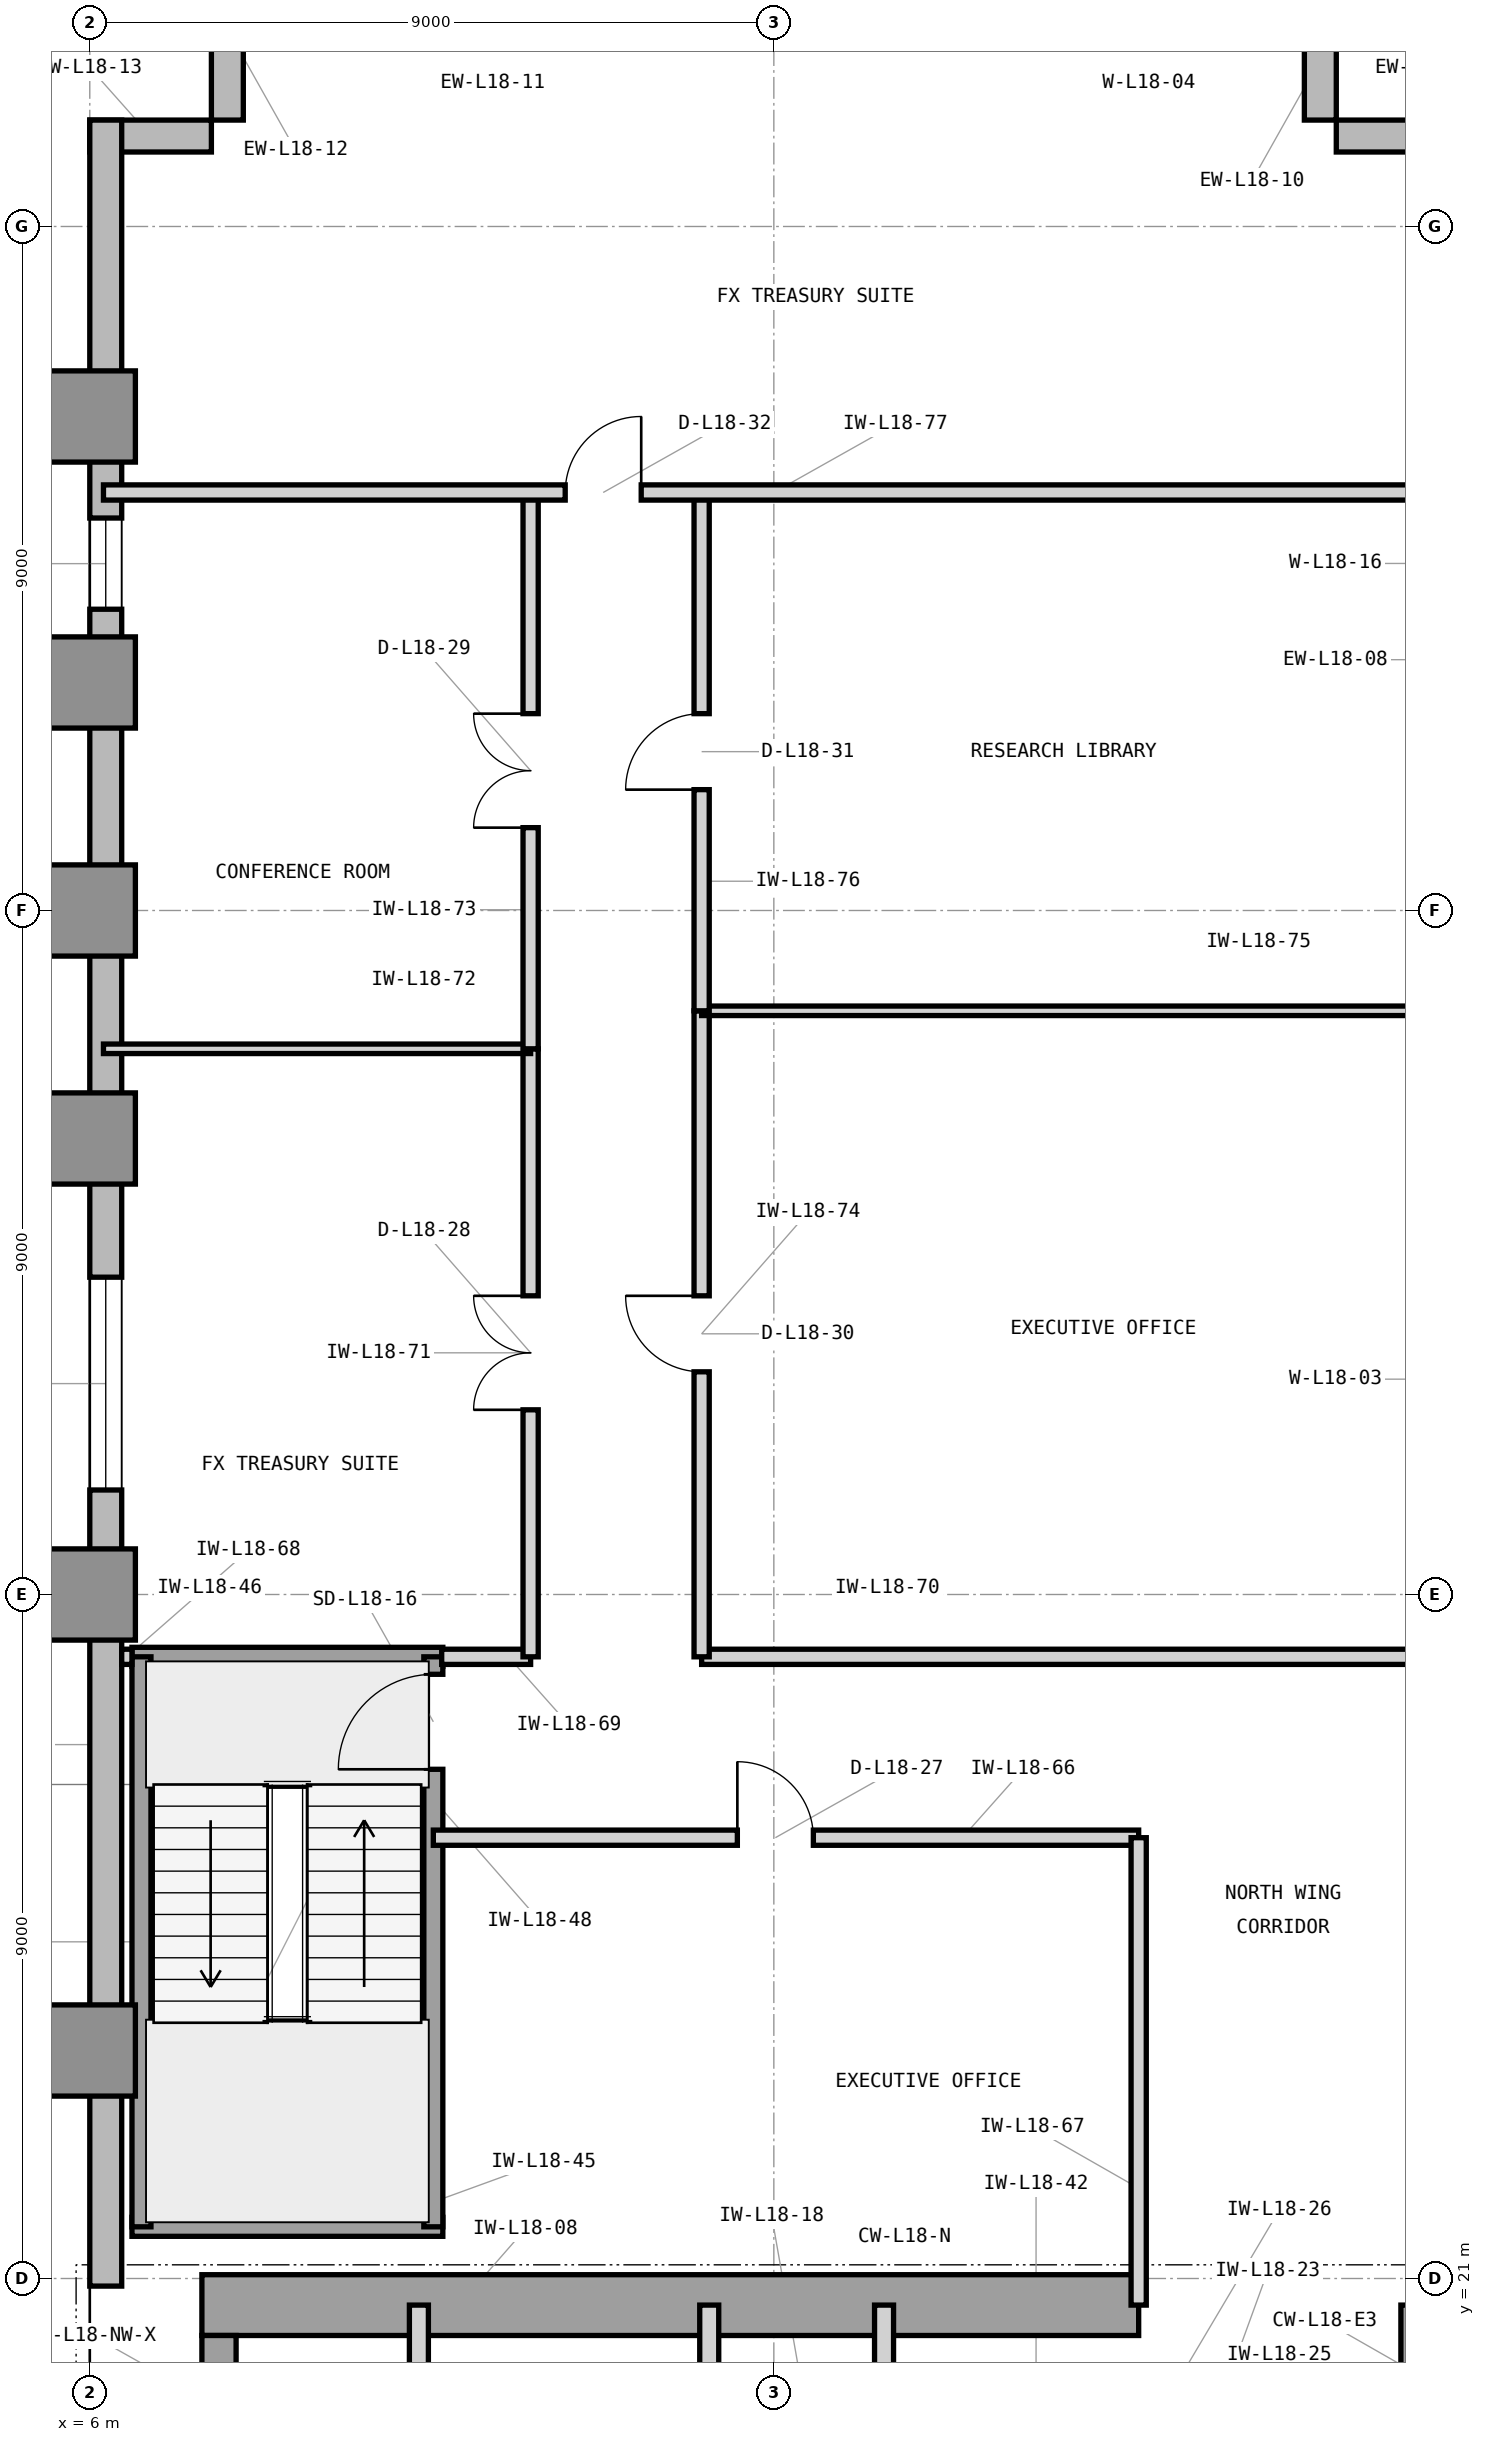
"""IFC4 building model, lengths in metres.
Left out: names, types, materials, properties, quantities, classifications, styles, units other than length and angle.
Written with IfcOpenShell. Run it as: python <this file> out.ifc"""

import sys

from ifc_helpers import new_model, si_unit, direction, frame, frame_2d, origin, origin_2d, place, context, subcontext, project, spatial, rectangle, extrude, element, fill, save


model = new_model("IFC4")
c1 = context("Model", 3, precision=1e-05, world=origin(), true_north=direction((0.0, 1.0)))
c2 = subcontext(c1, "Body", "Model", "MODEL_VIEW")
j1 = project(units=[si_unit("LENGTHUNIT", "METRE"), si_unit("PLANEANGLEUNIT", "RADIAN")], contexts=[c1])
p1 = place(None, origin())
s1 = spatial("IfcSite", under=j1, at=p1, CompositionType="ELEMENT")
p2 = place(p1, origin())
s2 = spatial("IfcBuilding", under=s1, at=p2, CompositionType="ELEMENT")
p3 = place(p2, frame((0.0, 0.0, 80.4)))
s3 = spatial("IfcBuildingStorey", under=s2, at=p3, CompositionType="ELEMENT", Elevation=80.4)
p4 = place(p3, frame((7.475, 20.65, 0.0), z_axis=(0.0, 0.0, 1.0), x_axis=(1.0, 0.0, 0.0)))
e1 = element("IfcWall", 1, at=p4, inside=s3, PredefinedType="SHEAR", context=c2, shape_type="SweptSolid", body=[
    extrude(rectangle(XDim=12.325, YDim=0.8, at=frame_2d((6.163, 0.0))), origin(), (0.0, 0.0, 1.0), 4.2),
])
p5 = place(p3, frame((23.65, 16.6, 0.0), z_axis=(0.0, 0.0, 1.0), x_axis=(0.0, 1.0, 0.0)))
e2 = element("IfcWall", 2, at=p5, inside=s3, PredefinedType="SHEAR", context=c2, shape_type="SweptSolid", body=[
    extrude(rectangle(XDim=4.05, YDim=0.8, at=frame_2d((2.025, 0.0))), origin(), (0.0, 0.0, 1.0), 4.2),
])
p6 = place(p3, frame((7.7, 19.575, 0.0), z_axis=(0.0, 0.0, 1.0), x_axis=(0.0, 1.0, 0.0)))
e3 = element("IfcWall", 3, at=p6, inside=s3, PredefinedType="SHEAR", context=c2, shape_type="SweptSolid", body=[
    extrude(rectangle(XDim=0.675, YDim=0.45, at=frame_2d((0.337, 0.0))), origin(), (0.0, 0.0, 1.0), 4.2),
])
for number, where, z_axis, x_axis in (
    (4, (6.0, 24.0, 0.0), (0.0, 0.0, 1.0), (1.0, 0.0, 0.0)),
    (5, (6.0, 30.0, 0.0), (0.0, 0.0, 1.0), (1.0, 0.0, 0.0)),
    (6, (6.0, 36.0, 0.0), (0.0, 0.0, 1.0), (1.0, 0.0, 0.0)),
    (7, (6.0, 39.0, 0.0), (0.0, 0.0, 1.0), (1.0, 0.0, 0.0)),
    (8, (6.0, 42.0, 0.0), (0.0, 0.0, 1.0), (1.0, 0.0, 0.0)),
    (9, (6.0, 45.5, 0.0), (0.0, 0.0, 1.0), (1.0, 0.0, 0.0)),
):
    element("IfcColumn", number, at=place(p3, frame(where, z_axis=z_axis, x_axis=x_axis)), inside=s3, PredefinedType="COLUMN", context=c2, shape_type="SweptSolid", body=[
        extrude(rectangle(XDim=1.2, YDim=1.2, at=origin_2d()), origin(), (0.0, 0.0, 1.0), 4.2),
    ])
for number, where, z_axis, x_axis in (
    (10, (24.0, 49.19, 0.0), (0.0, 0.0, 1.0), (-1.0, 0.0, 0.0)),
    (11, (22.19, 49.4, 0.0), (0.0, 0.0, 1.0), (0.0, 1.0, 0.0)),
    (12, (7.81, 51.0, 0.0), (0.0, 0.0, 1.0), (0.0, -1.0, 0.0)),
    (13, (7.6, 49.19, 0.0), (0.0, 0.0, 1.0), (-1.0, 0.0, 0.0)),
):
    element("IfcWall", number, at=place(p3, frame(where, z_axis=z_axis, x_axis=x_axis)), inside=s3, PredefinedType="STANDARD", context=c2, shape_type="SweptSolid", body=[
        extrude(rectangle(XDim=1.6, YDim=0.42, at=frame_2d((0.8, 0.0))), origin(), (0.0, 0.0, 1.0), 3.92),
    ])
p7 = place(p3, frame((6.21, 49.4, 0.0), z_axis=(0.0, 0.0, 1.0), x_axis=(0.0, -1.0, 0.0)))
e14 = element("IfcWall", 14, at=p7, inside=s3, PredefinedType="STANDARD", context=c2, shape_type="SweptSolid", body=[
    extrude(rectangle(XDim=28.5, YDim=0.42, at=frame_2d((14.25, 0.0))), origin(), (0.0, 0.0, 1.0), 3.92),
])
p8 = place(p7, frame((15.225, 0.0, 0.85)))
e15 = element("IfcOpeningElement", 15, at=p8, cuts=e14, PredefinedType="OPENING", context=c2, shape_type="SweptSolid", body=[
    extrude(rectangle(XDim=2.8, YDim=2.45, at=frame_2d((1.4, 1.225))), frame((0.0, 0.22, 0.0), z_axis=(0.0, -1.0, 0.0), x_axis=(1.0, 0.0, 0.0)), (0.0, 0.0, 1.0), 0.44),
])
p9 = place(p7, frame((5.236, 0.0, 0.85)))
e16 = element("IfcOpeningElement", 16, at=p9, cuts=e14, PredefinedType="OPENING", context=c2, shape_type="SweptSolid", body=[
    extrude(rectangle(XDim=1.2, YDim=2.45, at=frame_2d((0.6, 1.225))), frame((0.0, 0.22, 0.0), z_axis=(0.0, -1.0, 0.0), x_axis=(1.0, 0.0, 0.0)), (0.0, 0.0, 1.0), 0.44),
])
p10 = place(p3, frame((10.33, 19.45, 0.0), z_axis=(0.0, 0.0, 1.0), x_axis=(0.0, 1.0, 0.0)))
e17 = element("IfcWall", 17, at=p10, inside=s3, PredefinedType="PARTITIONING", context=c2, shape_type="SweptSolid", body=[
    extrude(rectangle(XDim=1.2, YDim=0.25, at=frame_2d((0.6, 0.0))), origin(), (0.0, 0.0, 1.0), 2.983),
])
for number, where, z_axis, x_axis in (
    (18, (14.15, 16.7, 0.0), (0.0, 0.0, 1.0), (0.0, 1.0, 0.0)),
    (19, (16.45, 16.7, 0.0), (0.0, 0.0, 1.0), (0.0, 1.0, 0.0)),
):
    element("IfcWall", number, at=place(p3, frame(where, z_axis=z_axis, x_axis=x_axis)), inside=s3, PredefinedType="PARTITIONING", context=c2, shape_type="SweptSolid", body=[
        extrude(rectangle(XDim=3.95, YDim=0.25, at=frame_2d((1.975, 0.0))), origin(), (0.0, 0.0, 1.0), 3.91),
    ])
for number, where, z_axis, x_axis in (
    (20, (6.555, 21.68, 0.0), (0.0, 0.0, 1.0), (1.0, 0.0, 0.0)),
    (21, (6.555, 29.18, 0.0), (0.0, 0.0, 1.0), (1.0, 0.0, 0.0)),
):
    element("IfcWall", number, at=place(p3, frame(where, z_axis=z_axis, x_axis=x_axis)), inside=s3, PredefinedType="SHEAR", context=c2, shape_type="SweptSolid", body=[
        extrude(rectangle(XDim=4.09, YDim=0.25, at=frame_2d((2.045, 0.0))), origin(), (0.0, 0.0, 1.0), 4.2),
    ])
p11 = place(p3, frame((6.68, 21.68, 0.0), z_axis=(0.0, 0.0, 1.0), x_axis=(0.0, 1.0, 0.0)))
e22 = element("IfcWall", 22, at=p11, inside=s3, PredefinedType="SHEAR", context=c2, shape_type="SweptSolid", body=[
    extrude(rectangle(XDim=7.5, YDim=0.25, at=frame_2d((3.75, 0.0))), origin(), (0.0, 0.0, 1.0), 4.2),
])
p12 = place(p3, frame((10.52, 21.68, 0.0), z_axis=(0.0, 0.0, 1.0), x_axis=(0.0, 1.0, 0.0)))
e23 = element("IfcWall", 23, at=p12, inside=s3, PredefinedType="SHEAR", context=c2, shape_type="SweptSolid", body=[
    extrude(rectangle(XDim=7.5, YDim=0.25, at=frame_2d((3.75, 0.0))), origin(), (0.0, 0.0, 1.0), 4.2),
])
p13 = place(p12, frame((6.02, 0.0, 0.0)))
e24 = element("IfcOpeningElement", 24, at=p13, cuts=e23, PredefinedType="OPENING", context=c2, shape_type="SweptSolid", body=[
    extrude(rectangle(XDim=1.25, YDim=2.2, at=frame_2d((0.625, 1.1))), frame((0.0, 0.135, 0.0), z_axis=(0.0, -1.0, 0.0), x_axis=(1.0, 0.0, 0.0)), (0.0, 0.0, 1.0), 0.27),
])
p14 = place(p3, frame((10.52, 26.8, 0.0), z_axis=(0.0, 0.0, 1.0), x_axis=(1.0, 0.0, 0.0)))
e25 = element("IfcWall", 25, at=p14, inside=s3, PredefinedType="PARTITIONING", context=c2, shape_type="SweptSolid", body=[
    extrude(rectangle(XDim=9.28, YDim=0.2, at=frame_2d((4.64, 0.0))), origin(), (0.0, 0.0, 1.0), 3.91),
])
p15 = place(p14, frame((4.0, 0.0, 0.0)))
e26 = element("IfcOpeningElement", 26, at=p15, cuts=e25, PredefinedType="OPENING", context=c2, shape_type="SweptSolid", body=[
    extrude(rectangle(XDim=1.0, YDim=2.15, at=frame_2d((0.5, 1.075))), frame((0.0, 0.11, 0.0), z_axis=(0.0, -1.0, 0.0), x_axis=(1.0, 0.0, 0.0)), (0.0, 0.0, 1.0), 0.22),
])
p16 = place(p3, frame((19.8, 20.65, 0.0), z_axis=(0.0, 0.0, 1.0), x_axis=(0.0, 1.0, 0.0)))
e27 = element("IfcWall", 27, at=p16, inside=s3, PredefinedType="PARTITIONING", context=c2, shape_type="SweptSolid", body=[
    extrude(rectangle(XDim=6.15, YDim=0.2, at=frame_2d((3.075, 0.0))), origin(), (0.0, 0.0, 1.0), 3.91),
])
p17 = place(p3, frame((6.42, 29.18, 0.0), z_axis=(0.0, 0.0, 1.0), x_axis=(1.0, 0.0, 0.0)))
e28 = element("IfcWall", 28, at=p17, inside=s3, PredefinedType="PARTITIONING", context=c2, shape_type="SweptSolid", body=[
    extrude(rectangle(XDim=0.135, YDim=0.2, at=frame_2d((0.067, 0.0))), origin(), (0.0, 0.0, 1.0), 3.91),
])
p18 = place(p3, frame((10.63, 29.18, 0.0), z_axis=(0.0, 0.0, 1.0), x_axis=(1.0, 0.0, 0.0)))
e29 = element("IfcWall", 29, at=p18, inside=s3, PredefinedType="PARTITIONING", context=c2, shape_type="SweptSolid", body=[
    extrude(rectangle(XDim=1.17, YDim=0.2, at=frame_2d((0.585, 0.0))), origin(), (0.0, 0.0, 1.0), 3.91),
])
p19 = place(p3, frame((14.05, 29.18, 0.0), z_axis=(0.0, 0.0, 1.0), x_axis=(1.0, 0.0, 0.0)))
e30 = element("IfcWall", 30, at=p19, inside=s3, PredefinedType="PARTITIONING", context=c2, shape_type="SweptSolid", body=[
    extrude(rectangle(XDim=9.77, YDim=0.2, at=frame_2d((4.885, 0.0))), origin(), (0.0, 0.0, 1.0), 3.91),
])
p20 = place(p3, frame((11.8, 29.18, 0.0), z_axis=(0.0, 0.0, 1.0), x_axis=(0.0, 1.0, 0.0)))
e31 = element("IfcWall", 31, at=p20, inside=s3, PredefinedType="PARTITIONING", context=c2, shape_type="SweptSolid", body=[
    extrude(rectangle(XDim=8.0, YDim=0.2, at=frame_2d((4.0, 0.0))), origin(), (0.0, 0.0, 1.0), 3.91),
])
p21 = place(p20, frame((3.25, 0.0, 0.0)))
e32 = element("IfcOpeningElement", 32, at=p21, cuts=e31, PredefinedType="OPENING", context=c2, shape_type="SweptSolid", body=[
    extrude(rectangle(XDim=1.5, YDim=2.3, at=frame_2d((0.75, 1.15))), frame((0.0, 0.11, 0.0), z_axis=(0.0, -1.0, 0.0), x_axis=(1.0, 0.0, 0.0)), (0.0, 0.0, 1.0), 0.22),
])
p22 = place(p3, frame((6.18, 37.18, 0.0), z_axis=(0.0, 0.0, 1.0), x_axis=(1.0, 0.0, 0.0)))
e33 = element("IfcWall", 33, at=p22, inside=s3, PredefinedType="PARTITIONING", context=c2, shape_type="SweptSolid", body=[
    extrude(rectangle(XDim=5.62, YDim=0.125, at=frame_2d((2.81, 0.0))), origin(), (0.0, 0.0, 1.0), 3.91),
])
p23 = place(p3, frame((11.8, 37.18, 0.0), z_axis=(0.0, 0.0, 1.0), x_axis=(0.0, 1.0, 0.0)))
e34 = element("IfcWall", 34, at=p23, inside=s3, PredefinedType="PARTITIONING", context=c2, shape_type="SweptSolid", body=[
    extrude(rectangle(XDim=7.32, YDim=0.2, at=frame_2d((3.66, 0.0))), origin(), (0.0, 0.0, 1.0), 3.91),
])
p24 = place(p23, frame((2.91, 0.0, 0.0)))
e35 = element("IfcOpeningElement", 35, at=p24, cuts=e34, PredefinedType="OPENING", context=c2, shape_type="SweptSolid", body=[
    extrude(rectangle(XDim=1.5, YDim=2.3, at=frame_2d((0.75, 1.15))), frame((0.0, 0.11, 0.0), z_axis=(0.0, -1.0, 0.0), x_axis=(1.0, 0.0, 0.0)), (0.0, 0.0, 1.0), 0.22),
])
p25 = place(p3, frame((14.05, 29.18, 0.0), z_axis=(0.0, 0.0, 1.0), x_axis=(0.0, 1.0, 0.0)))
e36 = element("IfcWall", 36, at=p25, inside=s3, PredefinedType="PARTITIONING", context=c2, shape_type="SweptSolid", body=[
    extrude(rectangle(XDim=8.5, YDim=0.2, at=frame_2d((4.25, 0.0))), origin(), (0.0, 0.0, 1.0), 3.91),
])
p26 = place(p25, frame((3.75, 0.0, 0.0)))
e37 = element("IfcOpeningElement", 37, at=p26, cuts=e36, PredefinedType="OPENING", context=c2, shape_type="SweptSolid", body=[
    extrude(rectangle(XDim=1.0, YDim=2.15, at=frame_2d((0.5, 1.075))), frame((0.0, 0.11, 0.0), z_axis=(0.0, -1.0, 0.0), x_axis=(1.0, 0.0, 0.0)), (0.0, 0.0, 1.0), 0.22),
])
p27 = place(p3, frame((14.05, 37.68, 0.0), z_axis=(0.0, 0.0, 1.0), x_axis=(1.0, 0.0, 0.0)))
e38 = element("IfcWall", 38, at=p27, inside=s3, PredefinedType="PARTITIONING", context=c2, shape_type="SweptSolid", body=[
    extrude(rectangle(XDim=9.77, YDim=0.125, at=frame_2d((4.885, 0.0))), origin(), (0.0, 0.0, 1.0), 3.91),
])
p28 = place(p3, frame((14.05, 37.68, 0.0), z_axis=(0.0, 0.0, 1.0), x_axis=(0.0, 1.0, 0.0)))
e39 = element("IfcWall", 39, at=p28, inside=s3, PredefinedType="PARTITIONING", context=c2, shape_type="SweptSolid", body=[
    extrude(rectangle(XDim=6.82, YDim=0.2, at=frame_2d((3.41, 0.0))), origin(), (0.0, 0.0, 1.0), 3.91),
])
p29 = place(p28, frame((2.91, 0.0, 0.0)))
e40 = element("IfcOpeningElement", 40, at=p29, cuts=e39, PredefinedType="OPENING", context=c2, shape_type="SweptSolid", body=[
    extrude(rectangle(XDim=1.0, YDim=2.15, at=frame_2d((0.5, 1.075))), frame((0.0, 0.11, 0.0), z_axis=(0.0, -1.0, 0.0), x_axis=(1.0, 0.0, 0.0)), (0.0, 0.0, 1.0), 0.22),
])
p30 = place(p3, frame((6.18, 44.5, 0.0), z_axis=(0.0, 0.0, 1.0), x_axis=(1.0, 0.0, 0.0)))
e41 = element("IfcWall", 41, at=p30, inside=s3, PredefinedType="PARTITIONING", context=c2, shape_type="SweptSolid", body=[
    extrude(rectangle(XDim=17.64, YDim=0.2, at=frame_2d((8.82, 0.0))), origin(), (0.0, 0.0, 1.0), 3.91),
])
p31 = place(p30, frame((6.075, 0.0, 0.0)))
e42 = element("IfcOpeningElement", 42, at=p31, cuts=e41, PredefinedType="OPENING", context=c2, shape_type="SweptSolid", body=[
    extrude(rectangle(XDim=1.0, YDim=2.15, at=frame_2d((0.5, 1.075))), frame((0.0, 0.11, 0.0), z_axis=(0.0, -1.0, 0.0), x_axis=(1.0, 0.0, 0.0)), (0.0, 0.0, 1.0), 0.22),
])
p32 = place(p8, origin())
e43 = element("IfcWindow", 43, at=p32, inside=s3, PartitioningType="SINGLE_PANEL", PredefinedType="WINDOW", context=c2, shape_type="SweptSolid", body=[
    extrude(rectangle(XDim=2.8, YDim=2.45, at=frame_2d((1.4, 1.225))), frame((0.0, 0.11, 0.0), z_axis=(0.0, -1.0, 0.0), x_axis=(1.0, 0.0, 0.0)), (0.0, 0.0, 1.0), 0.06),
])
fill(e15, e43)
p33 = place(p13, origin())
e44 = element("IfcDoor", 44, at=p33, inside=s3, OperationType="SINGLE_SWING_LEFT", PredefinedType="DOOR", context=c2, shape_type="SweptSolid", body=[
    extrude(rectangle(XDim=1.25, YDim=2.2, at=frame_2d((0.625, 1.1))), frame((0.0, 0.025, 0.0), z_axis=(0.0, -1.0, 0.0), x_axis=(1.0, 0.0, 0.0)), (0.0, 0.0, 1.0), 0.05),
])
fill(e24, e44)
p34 = place(p15, origin())
e45 = element("IfcDoor", 45, at=p34, inside=s3, OperationType="SINGLE_SWING_LEFT", PredefinedType="DOOR", context=c2, shape_type="SweptSolid", body=[
    extrude(rectangle(XDim=1.0, YDim=2.15, at=frame_2d((0.5, 1.075))), frame((0.0, 0.025, 0.0), z_axis=(0.0, -1.0, 0.0), x_axis=(1.0, 0.0, 0.0)), (0.0, 0.0, 1.0), 0.05),
])
fill(e26, e45)
p35 = place(p21, origin())
e46 = element("IfcDoor", 46, at=p35, inside=s3, OperationType="DOUBLE_DOOR_SINGLE_SWING", PredefinedType="DOOR", context=c2, shape_type="SweptSolid", body=[
    extrude(rectangle(XDim=1.5, YDim=2.3, at=frame_2d((0.75, 1.15))), frame((0.0, 0.025, 0.0), z_axis=(0.0, -1.0, 0.0), x_axis=(1.0, 0.0, 0.0)), (0.0, 0.0, 1.0), 0.05),
])
fill(e32, e46)
p36 = place(p24, origin())
e47 = element("IfcDoor", 47, at=p36, inside=s3, OperationType="DOUBLE_DOOR_SINGLE_SWING", PredefinedType="DOOR", context=c2, shape_type="SweptSolid", body=[
    extrude(rectangle(XDim=1.5, YDim=2.3, at=frame_2d((0.75, 1.15))), frame((0.0, 0.025, 0.0), z_axis=(0.0, -1.0, 0.0), x_axis=(1.0, 0.0, 0.0)), (0.0, 0.0, 1.0), 0.05),
])
fill(e35, e47)
p37 = place(p26, origin())
e48 = element("IfcDoor", 48, at=p37, inside=s3, OperationType="SINGLE_SWING_RIGHT", PredefinedType="DOOR", context=c2, shape_type="SweptSolid", body=[
    extrude(rectangle(XDim=1.0, YDim=2.15, at=frame_2d((0.5, 1.075))), frame((0.0, 0.025, 0.0), z_axis=(0.0, -1.0, 0.0), x_axis=(1.0, 0.0, 0.0)), (0.0, 0.0, 1.0), 0.05),
])
fill(e37, e48)
p38 = place(p29, origin())
e49 = element("IfcDoor", 49, at=p38, inside=s3, OperationType="SINGLE_SWING_LEFT", PredefinedType="DOOR", context=c2, shape_type="SweptSolid", body=[
    extrude(rectangle(XDim=1.0, YDim=2.15, at=frame_2d((0.5, 1.075))), frame((0.0, 0.025, 0.0), z_axis=(0.0, -1.0, 0.0), x_axis=(1.0, 0.0, 0.0)), (0.0, 0.0, 1.0), 0.05),
])
fill(e40, e49)
p39 = place(p31, origin())
e50 = element("IfcDoor", 50, at=p39, inside=s3, OperationType="SINGLE_SWING_RIGHT", PredefinedType="DOOR", context=c2, shape_type="SweptSolid", body=[
    extrude(rectangle(XDim=1.0, YDim=2.15, at=frame_2d((0.5, 1.075))), frame((0.0, 0.025, 0.0), z_axis=(0.0, -1.0, 0.0), x_axis=(1.0, 0.0, 0.0)), (0.0, 0.0, 1.0), 0.05),
])
fill(e42, e50)
p40 = place(p9, origin())
e51 = element("IfcWindow", 51, at=p40, inside=s3, PartitioningType="SINGLE_PANEL", PredefinedType="WINDOW", context=c2, shape_type="SweptSolid", body=[
    extrude(rectangle(XDim=1.2, YDim=2.45, at=frame_2d((0.6, 1.225))), frame((0.0, 0.11, 0.0), z_axis=(0.0, -1.0, 0.0), x_axis=(1.0, 0.0, 0.0)), (0.0, 0.0, 1.0), 0.06),
])
fill(e16, e51)
save(model, sys.argv[1])
